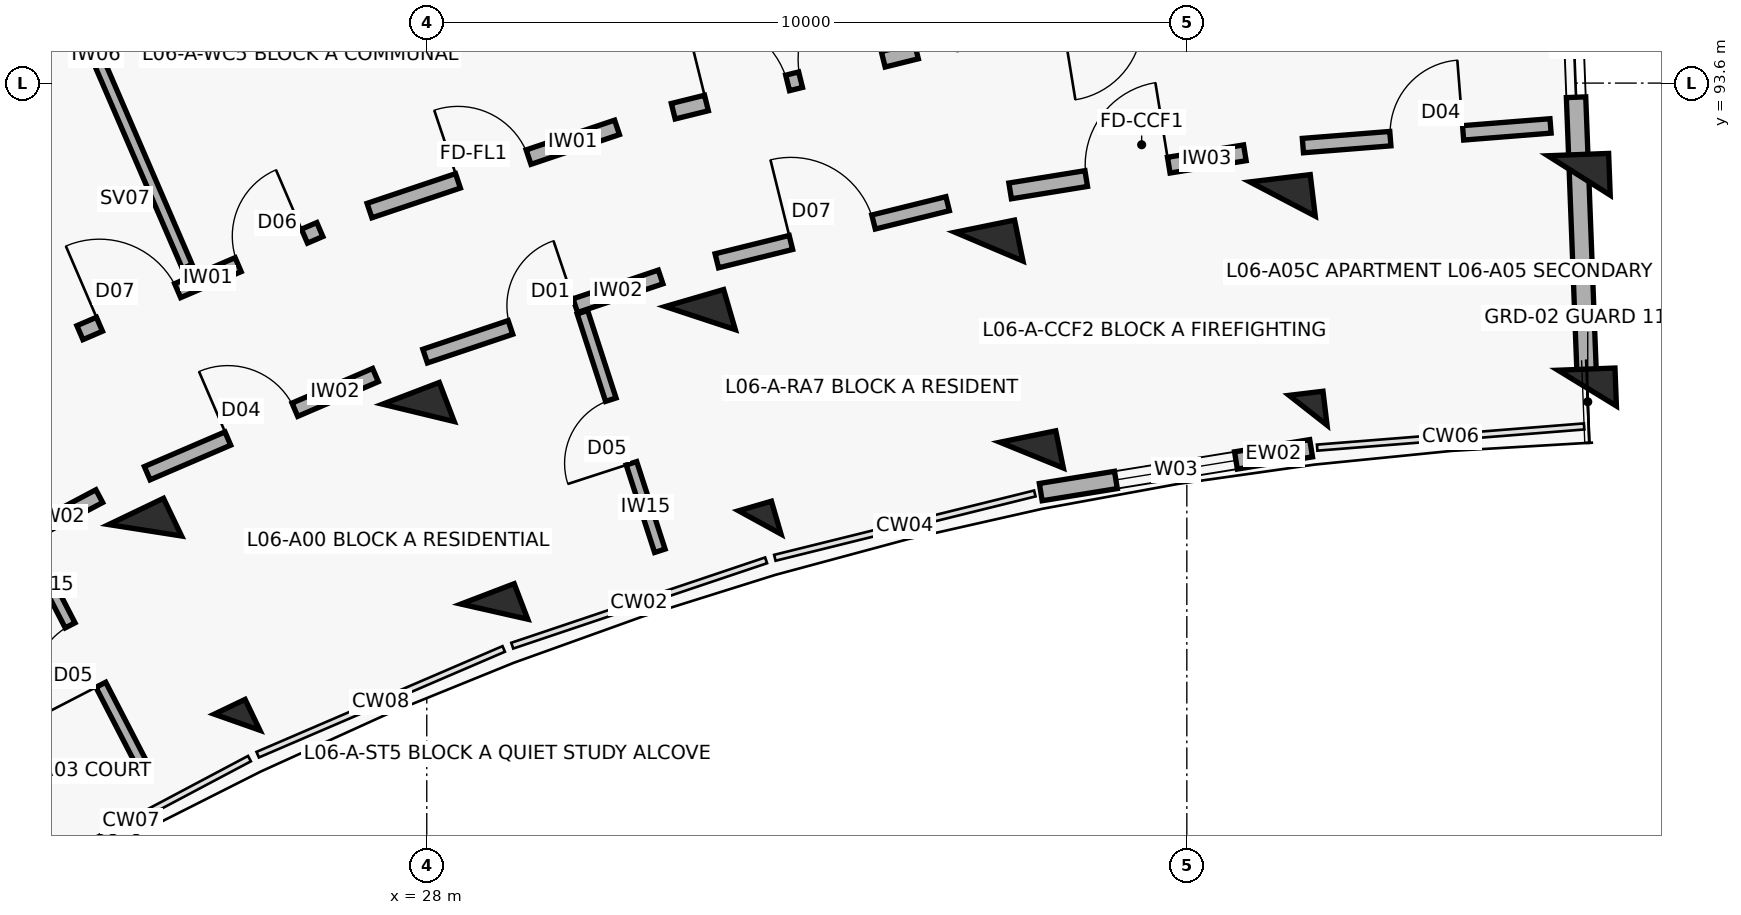
"""IFC4 building model, lengths in metres.
Left out: names, types, materials, properties, quantities, classifications, styles, units other than length and angle.
Written with IfcOpenShell. Run it as: python <this file> out.ifc"""

import sys

from ifc_helpers import new_model, si_unit, direction, frame, frame_2d, origin, origin_2d, place, context, subcontext, project, spatial, rectangle, extrude, element, fill, save


model = new_model("IFC4")
c1 = context("Model", 3, precision=1e-05, world=origin(), true_north=direction((0.0, 1.0)))
c2 = subcontext(c1, "Body", "Model", "MODEL_VIEW")
j1 = project(units=[si_unit("LENGTHUNIT", "METRE"), si_unit("PLANEANGLEUNIT", "RADIAN")], contexts=[c1])
p1 = place(None, origin())
s1 = spatial("IfcSite", under=j1, at=p1, CompositionType="ELEMENT")
p2 = place(p1, origin())
s2 = spatial("IfcBuilding", under=s1, at=p2, CompositionType="ELEMENT")
p3 = place(p2, frame((0.0, 0.0, 20.5)))
s3 = spatial("IfcBuildingStorey", under=s2, at=p3, CompositionType="ELEMENT", Elevation=20.5)
p4 = place(p3, frame((25.504, 85.191, 0.0), z_axis=(0.0, 0.0, 1.0), x_axis=(-0.432085748802, 0.901832526405, 0.0)))
e1 = element("IfcColumn", 1, at=p4, inside=s3, PredefinedType="COLUMN", context=c2, shape_type="SweptSolid", body=[
    extrude(rectangle(XDim=0.45, YDim=0.45, at=origin_2d()), origin(), (0.0, 0.0, 1.0), 3.1),
])
p5 = place(p3, frame((24.294, 87.716, 0.0), z_axis=(0.0, 0.0, 1.0), x_axis=(-0.432085748802, 0.901832526405, 0.0)))
e2 = element("IfcColumn", 2, at=p5, inside=s3, PredefinedType="COLUMN", context=c2, shape_type="SweptSolid", body=[
    extrude(rectangle(XDim=0.55, YDim=0.8, at=origin_2d()), origin(), (0.0, 0.0, 1.0), 3.1),
])
p6 = place(p3, frame((28.889, 86.646, 0.0), z_axis=(0.0, 0.0, 1.0), x_axis=(-0.357064076459, 0.934079892355, 0.0)))
e3 = element("IfcColumn", 3, at=p6, inside=s3, PredefinedType="COLUMN", context=c2, shape_type="SweptSolid", body=[
    extrude(rectangle(XDim=0.5, YDim=0.75, at=origin_2d()), origin(), (0.0, 0.0, 1.0), 3.1),
])
p7 = place(p3, frame((27.889, 89.261, 0.0), z_axis=(0.0, 0.0, 1.0), x_axis=(-0.357064076459, 0.934079892355, 0.0)))
e4 = element("IfcColumn", 4, at=p7, inside=s3, PredefinedType="COLUMN", context=c2, shape_type="SweptSolid", body=[
    extrude(rectangle(XDim=0.55, YDim=0.8, at=origin_2d()), origin(), (0.0, 0.0, 1.0), 3.1),
])
p8 = place(p3, frame((32.382, 87.82, 0.0), z_axis=(0.0, 0.0, 1.0), x_axis=(-0.27966144946, 0.96009867914, 0.0)))
e5 = element("IfcColumn", 5, at=p8, inside=s3, PredefinedType="COLUMN", context=c2, shape_type="SweptSolid", body=[
    extrude(rectangle(XDim=0.45, YDim=0.45, at=origin_2d()), origin(), (0.0, 0.0, 1.0), 3.1),
])
p9 = place(p3, frame((31.599, 90.508, 0.0), z_axis=(0.0, 0.0, 1.0), x_axis=(-0.27966144946, 0.96009867914, 0.0)))
e6 = element("IfcColumn", 6, at=p9, inside=s3, PredefinedType="COLUMN", context=c2, shape_type="SweptSolid", body=[
    extrude(rectangle(XDim=0.55, YDim=0.8, at=origin_2d()), origin(), (0.0, 0.0, 1.0), 3.1),
])
p10 = place(p3, frame((35.958, 88.705, 0.0), z_axis=(0.0, 0.0, 1.0), x_axis=(-0.200393999665, 0.979715389742, 0.0)))
e7 = element("IfcColumn", 7, at=p10, inside=s3, PredefinedType="COLUMN", context=c2, shape_type="SweptSolid", body=[
    extrude(rectangle(XDim=0.5, YDim=0.75, at=origin_2d()), origin(), (0.0, 0.0, 1.0), 3.1),
])
p11 = place(p3, frame((35.397, 91.448, 0.0), z_axis=(0.0, 0.0, 1.0), x_axis=(-0.200393999665, 0.979715389742, 0.0)))
e8 = element("IfcColumn", 8, at=p11, inside=s3, PredefinedType="COLUMN", context=c2, shape_type="SweptSolid", body=[
    extrude(rectangle(XDim=0.55, YDim=0.8, at=origin_2d()), origin(), (0.0, 0.0, 1.0), 3.1),
])
p12 = place(p3, frame((39.595, 89.295, 0.0), z_axis=(0.0, 0.0, 1.0), x_axis=(-0.119790293837, 0.992799217114, 0.0)))
e9 = element("IfcColumn", 9, at=p12, inside=s3, PredefinedType="COLUMN", context=c2, shape_type="SweptSolid", body=[
    extrude(rectangle(XDim=0.45, YDim=0.45, at=origin_2d()), origin(), (0.0, 0.0, 1.0), 3.1),
])
p13 = place(p3, frame((39.26, 92.075, 0.0), z_axis=(0.0, 0.0, 1.0), x_axis=(-0.119790293837, 0.992799217114, 0.0)))
e10 = element("IfcColumn", 10, at=p13, inside=s3, PredefinedType="COLUMN", context=c2, shape_type="SweptSolid", body=[
    extrude(rectangle(XDim=0.55, YDim=0.8, at=origin_2d()), origin(), (0.0, 0.0, 1.0), 3.1),
])
p14 = place(p3, frame((43.268, 89.587, 0.0), z_axis=(0.0, 0.0, 1.0), x_axis=(-0.038387809088, 0.999262916411, 0.0)))
e11 = element("IfcColumn", 11, at=p14, inside=s3, PredefinedType="COLUMN", context=c2, shape_type="SweptSolid", body=[
    extrude(rectangle(XDim=0.5, YDim=0.75, at=origin_2d()), origin(), (0.0, 0.0, 1.0), 3.1),
])
p15 = place(p3, frame((43.16, 92.385, 0.0), z_axis=(0.0, 0.0, 1.0), x_axis=(-0.038387809088, 0.999262916411, 0.0)))
e12 = element("IfcColumn", 12, at=p15, inside=s3, PredefinedType="COLUMN", context=c2, shape_type="SweptSolid", body=[
    extrude(rectangle(XDim=0.55, YDim=0.8, at=origin_2d()), origin(), (0.0, 0.0, 1.0), 3.1),
])
p16 = place(p3, frame((36.078, 88.218, 0.0), z_axis=(0.0, 0.0, 1.0), x_axis=(0.987080874485, 0.160222804952, 0.0)))
e13 = element("IfcWall", 13, at=p16, inside=s3, PredefinedType="SOLIDWALL", context=c2, shape_type="SweptSolid", body=[
    extrude(rectangle(XDim=3.604, YDim=0.23, at=frame_2d((1.802, 0.0))), origin(), (0.0, 0.0, 1.0), 2.25),
])
p17 = place(p16, frame((1.002, 0.0, 0.32)))
e14 = element("IfcOpeningElement", 14, at=p17, cuts=e13, PredefinedType="OPENING", context=c2, shape_type="SweptSolid", body=[
    extrude(rectangle(XDim=1.6, YDim=1.5, at=frame_2d((0.8, 0.75))), frame((0.0, 0.125, 0.0), z_axis=(0.0, -1.0, 0.0), x_axis=(1.0, 0.0, 0.0)), (0.0, 0.0, 1.0), 0.25),
])
p18 = place(p3, frame((43.259, 89.827, 0.0), z_axis=(0.0, 0.0, 1.0), x_axis=(-0.038407966241, 0.999262141847, 0.0)))
e15 = element("IfcWall", 15, at=p18, inside=s3, PredefinedType="SOLIDWALL", context=c2, shape_type="SweptSolid", body=[
    extrude(rectangle(XDim=8.2, YDim=0.255, at=frame_2d((4.1, 0.0))), origin(), (0.0, 0.0, 1.0), 2.18),
])
p19 = place(p18, frame((3.59, 0.0, 0.75)))
e16 = element("IfcOpeningElement", 16, at=p19, cuts=e15, PredefinedType="OPENING", context=c2, shape_type="SweptSolid", body=[
    extrude(rectangle(XDim=1.35, YDim=1.35, at=frame_2d((0.675, 0.675))), frame((0.0, 0.137, 0.0), z_axis=(0.0, -1.0, 0.0), x_axis=(1.0, 0.0, 0.0)), (0.0, 0.0, 1.0), 0.275),
])
p20 = place(p3, frame((20.804, 86.634, 0.0), z_axis=(0.0, 0.0, 1.0), x_axis=(0.883444301944, 0.468536194293, 0.0)))
e17 = element("IfcWall", 17, at=p20, inside=s3, PredefinedType="SOLIDWALL", context=c2, shape_type="SweptSolid", body=[
    extrude(rectangle(XDim=3.269, YDim=0.19, at=frame_2d((1.634, 0.0))), origin(), (0.0, 0.0, 1.0), 2.08),
])
p21 = place(p20, frame((1.164, 0.0, 0.0)))
e18 = element("IfcOpeningElement", 18, at=p21, cuts=e17, PredefinedType="OPENING", context=c2, shape_type="SweptSolid", body=[
    extrude(rectangle(XDim=0.94, YDim=2.1, at=frame_2d((0.47, 1.05))), frame((0.0, 0.105, 0.0), z_axis=(0.0, -1.0, 0.0), x_axis=(1.0, 0.0, 0.0)), (0.0, 0.0, 1.0), 0.21),
])
p22 = place(p3, frame((24.267, 84.608, 0.0), z_axis=(0.0, 0.0, 1.0), x_axis=(-0.459217611894, 0.888323806349, 0.0)))
e19 = element("IfcWall", 19, at=p22, inside=s3, PredefinedType="PARTITIONING", context=c2, shape_type="SweptSolid", body=[
    extrude(rectangle(XDim=3.3, YDim=0.145, at=frame_2d((1.65, 0.0))), origin(), (0.0, 0.0, 1.0), 2.08),
])
p23 = place(p22, frame((1.21, 0.0, 0.0)))
e20 = element("IfcOpeningElement", 20, at=p23, cuts=e19, PredefinedType="OPENING", context=c2, shape_type="SweptSolid", body=[
    extrude(rectangle(XDim=0.88, YDim=2.1, at=frame_2d((0.44, 1.05))), frame((0.0, 0.083, 0.0), z_axis=(0.0, -1.0, 0.0), x_axis=(1.0, 0.0, 0.0)), (0.0, 0.0, 1.0), 0.165),
])
p24 = place(p3, frame((23.437, 90.316, 0.0), z_axis=(0.0, 0.0, 1.0), x_axis=(0.918718172399, 0.394913813008, 0.0)))
e21 = element("IfcWall", 21, at=p24, inside=s3, PredefinedType="SOLIDWALL", context=c2, shape_type="SweptSolid", body=[
    extrude(rectangle(XDim=3.436, YDim=0.2, at=frame_2d((1.718, 0.0))), origin(), (0.0, 0.0, 1.0), 2.08),
])
p25 = place(p24, frame((0.28, 0.0, 0.0)))
e22 = element("IfcOpeningElement", 22, at=p25, cuts=e21, PredefinedType="OPENING", context=c2, shape_type="SweptSolid", body=[
    extrude(rectangle(XDim=1.12, YDim=2.15, at=frame_2d((0.56, 1.075))), frame((0.0, 0.11, 0.0), z_axis=(0.0, -1.0, 0.0), x_axis=(1.0, 0.0, 0.0)), (0.0, 0.0, 1.0), 0.22),
])
p26 = place(p24, frame((2.266, 0.0, 0.0)))
e23 = element("IfcOpeningElement", 23, at=p26, cuts=e21, PredefinedType="OPENING", context=c2, shape_type="SweptSolid", body=[
    extrude(rectangle(XDim=0.95, YDim=2.1, at=frame_2d((0.475, 1.05))), frame((0.0, 0.11, 0.0), z_axis=(0.0, -1.0, 0.0), x_axis=(1.0, 0.0, 0.0)), (0.0, 0.0, 1.0), 0.22),
])
p27 = place(p3, frame((24.322, 88.467, 0.0), z_axis=(0.0, 0.0, 1.0), x_axis=(0.918723391052, 0.394901672235, 0.0)))
e24 = element("IfcWall", 24, at=p27, inside=s3, PredefinedType="SOLIDWALL", context=c2, shape_type="SweptSolid", body=[
    extrude(rectangle(XDim=3.269, YDim=0.19, at=frame_2d((1.634, 0.0))), origin(), (0.0, 0.0, 1.0), 2.08),
])
p28 = place(p27, frame((1.154, 0.0, 0.0)))
e25 = element("IfcOpeningElement", 25, at=p28, cuts=e24, PredefinedType="OPENING", context=c2, shape_type="SweptSolid", body=[
    extrude(rectangle(XDim=0.96, YDim=2.1, at=frame_2d((0.48, 1.05))), frame((0.0, 0.105, 0.0), z_axis=(0.0, -1.0, 0.0), x_axis=(1.0, 0.0, 0.0)), (0.0, 0.0, 1.0), 0.21),
])
p29 = place(p3, frame((24.849, 91.187, 0.0), z_axis=(0.0, 0.0, 1.0), x_axis=(-0.396278945437, 0.91813016365, 0.0)))
e26 = element("IfcWall", 26, at=p29, inside=s3, PredefinedType="PARTITIONING", context=c2, shape_type="SweptSolid", body=[
    extrude(rectangle(XDim=7.95, YDim=0.14, at=frame_2d((3.975, 0.0))), origin(), (0.0, 0.0, 1.0), 2.08),
])
p30 = place(p29, frame((6.05, 0.0, 0.0)))
e27 = element("IfcOpeningElement", 27, at=p30, cuts=e26, PredefinedType="OPENING", context=c2, shape_type="SweptSolid", body=[
    extrude(rectangle(XDim=0.92, YDim=2.1, at=frame_2d((0.46, 1.05))), frame((0.0, 0.08, 0.0), z_axis=(0.0, -1.0, 0.0), x_axis=(1.0, 0.0, 0.0)), (0.0, 0.0, 1.0), 0.16),
])
p31 = place(p3, frame((27.247, 91.923, 0.0), z_axis=(0.0, 0.0, 1.0), x_axis=(0.947863007629, 0.318678080151, 0.0)))
e28 = element("IfcWall", 28, at=p31, inside=s3, PredefinedType="SOLIDWALL", context=c2, shape_type="SweptSolid", body=[
    extrude(rectangle(XDim=3.436, YDim=0.2, at=frame_2d((1.718, 0.0))), origin(), (0.0, 0.0, 1.0), 2.08),
])
p32 = place(p31, frame((1.228, 0.0, 0.0)))
e29 = element("IfcOpeningElement", 29, at=p32, cuts=e28, PredefinedType="OPENING", context=c2, shape_type="SweptSolid", body=[
    extrude(rectangle(XDim=0.98, YDim=2.15, at=frame_2d((0.49, 1.075))), frame((0.0, 0.11, 0.0), z_axis=(0.0, -1.0, 0.0), x_axis=(1.0, 0.0, 0.0)), (0.0, 0.0, 1.0), 0.22),
])
p33 = place(p3, frame((27.979, 90.008, 0.0), z_axis=(0.0, 0.0, 1.0), x_axis=(0.94787351033, 0.318646839643, 0.0)))
e30 = element("IfcWall", 30, at=p33, inside=s3, PredefinedType="SOLIDWALL", context=c2, shape_type="SweptSolid", body=[
    extrude(rectangle(XDim=3.269, YDim=0.19, at=frame_2d((1.634, 0.0))), origin(), (0.0, 0.0, 1.0), 2.08),
])
p34 = place(p33, frame((1.184, 0.0, 0.0)))
e31 = element("IfcOpeningElement", 31, at=p34, cuts=e30, PredefinedType="OPENING", context=c2, shape_type="SweptSolid", body=[
    extrude(rectangle(XDim=0.9, YDim=2.1, at=frame_2d((0.45, 1.05))), frame((0.0, 0.105, 0.0), z_axis=(0.0, -1.0, 0.0), x_axis=(1.0, 0.0, 0.0)), (0.0, 0.0, 1.0), 0.21),
])
p35 = place(p3, frame((31.066, 87.446, 0.0), z_axis=(0.0, 0.0, 1.0), x_axis=(-0.308582493915, 0.951197584337, 0.0)))
e32 = element("IfcWall", 32, at=p35, inside=s3, PredefinedType="PARTITIONING", context=c2, shape_type="SweptSolid", body=[
    extrude(rectangle(XDim=3.3, YDim=0.145, at=frame_2d((1.65, 0.0))), origin(), (0.0, 0.0, 1.0), 2.08),
])
p36 = place(p35, frame((1.21, 0.0, 0.0)))
e33 = element("IfcOpeningElement", 33, at=p36, cuts=e32, PredefinedType="OPENING", context=c2, shape_type="SweptSolid", body=[
    extrude(rectangle(XDim=0.88, YDim=2.1, at=frame_2d((0.44, 1.05))), frame((0.0, 0.083, 0.0), z_axis=(0.0, -1.0, 0.0), x_axis=(1.0, 0.0, 0.0)), (0.0, 0.0, 1.0), 0.165),
])
p37 = place(p3, frame((31.243, 93.23, 0.0), z_axis=(0.0, 0.0, 1.0), x_axis=(0.970719238682, 0.240216901263, 0.0)))
e34 = element("IfcWall", 34, at=p37, inside=s3, PredefinedType="SOLIDWALL", context=c2, shape_type="SweptSolid", body=[
    extrude(rectangle(XDim=3.296, YDim=0.21, at=frame_2d((1.648, 0.0))), origin(), (0.0, 0.0, 1.0), 2.08),
])
p38 = place(p37, frame((0.45, 0.0, 0.0)))
e35 = element("IfcOpeningElement", 35, at=p38, cuts=e34, PredefinedType="OPENING", context=c2, shape_type="SweptSolid", body=[
    extrude(rectangle(XDim=1.1, YDim=2.15, at=frame_2d((0.55, 1.075))), frame((0.0, 0.115, 0.0), z_axis=(0.0, -1.0, 0.0), x_axis=(1.0, 0.0, 0.0)), (0.0, 0.0, 1.0), 0.23),
])
p39 = place(p37, frame((1.726, 0.0, 0.0)))
e36 = element("IfcOpeningElement", 36, at=p39, cuts=e34, PredefinedType="OPENING", context=c2, shape_type="SweptSolid", body=[
    extrude(rectangle(XDim=1.12, YDim=2.15, at=frame_2d((0.56, 1.075))), frame((0.0, 0.115, 0.0), z_axis=(0.0, -1.0, 0.0), x_axis=(1.0, 0.0, 0.0)), (0.0, 0.0, 1.0), 0.23),
])
p40 = place(p3, frame((31.816, 91.262, 0.0), z_axis=(0.0, 0.0, 1.0), x_axis=(0.970727194092, 0.240184751078, 0.0)))
e37 = element("IfcWall", 37, at=p40, inside=s3, PredefinedType="SOLIDWALL", context=c2, shape_type="SweptSolid", body=[
    extrude(rectangle(XDim=3.129, YDim=0.19, at=frame_2d((1.564, 0.0))), origin(), (0.0, 0.0, 1.0), 2.08),
])
p41 = place(p40, frame((1.004, 0.0, 0.0)))
e38 = element("IfcOpeningElement", 38, at=p41, cuts=e37, PredefinedType="OPENING", context=c2, shape_type="SweptSolid", body=[
    extrude(rectangle(XDim=1.12, YDim=2.15, at=frame_2d((0.56, 1.075))), frame((0.0, 0.105, 0.0), z_axis=(0.0, -1.0, 0.0), x_axis=(1.0, 0.0, 0.0)), (0.0, 0.0, 1.0), 0.21),
])
p42 = place(p3, frame((35.676, 92.181, 0.0), z_axis=(0.0, 0.0, 1.0), x_axis=(0.98707079686, 0.160284877599, 0.0)))
e39 = element("IfcWall", 39, at=p42, inside=s3, PredefinedType="SOLIDWALL", context=c2, shape_type="SweptSolid", body=[
    extrude(rectangle(XDim=3.129, YDim=0.21, at=frame_2d((1.564, 0.0))), origin(), (0.0, 0.0, 1.0), 2.08),
])
p43 = place(p42, frame((1.014, 0.0, 0.0)))
e40 = element("IfcOpeningElement", 40, at=p43, cuts=e39, PredefinedType="OPENING", context=c2, shape_type="SweptSolid", body=[
    extrude(rectangle(XDim=1.1, YDim=2.15, at=frame_2d((0.55, 1.075))), frame((0.0, 0.115, 0.0), z_axis=(0.0, -1.0, 0.0), x_axis=(1.0, 0.0, 0.0)), (0.0, 0.0, 1.0), 0.23),
])
p44 = place(p3, frame((39.527, 92.778, 0.0), z_axis=(0.0, 0.0, 1.0), x_axis=(0.99686660806, 0.07910098441, 0.0)))
e41 = element("IfcWall", 41, at=p44, inside=s3, PredefinedType="SOLIDWALL", context=c2, shape_type="SweptSolid", body=[
    extrude(rectangle(XDim=3.269, YDim=0.19, at=frame_2d((1.634, 0.0))), origin(), (0.0, 0.0, 1.0), 2.08),
])
p45 = place(p44, frame((1.154, 0.0, 0.0)))
e42 = element("IfcOpeningElement", 42, at=p45, cuts=e41, PredefinedType="OPENING", context=c2, shape_type="SweptSolid", body=[
    extrude(rectangle(XDim=0.96, YDim=2.1, at=frame_2d((0.48, 1.05))), frame((0.0, 0.105, 0.0), z_axis=(0.0, -1.0, 0.0), x_axis=(1.0, 0.0, 0.0)), (0.0, 0.0, 1.0), 0.21),
])
p46 = place(p17, origin())
e43 = element("IfcWindow", 43, at=p46, inside=s3, PartitioningType="DOUBLE_PANEL_VERTICAL", PredefinedType="WINDOW", context=c2, shape_type="SweptSolid", body=[
    extrude(rectangle(XDim=1.6, YDim=1.5, at=frame_2d((0.8, 0.75))), frame((0.0, 0.03, 0.0), z_axis=(0.0, -1.0, 0.0), x_axis=(1.0, 0.0, 0.0)), (0.0, 0.0, 1.0), 0.06),
])
fill(e14, e43)
p47 = place(p19, origin())
e44 = element("IfcWindow", 44, at=p47, inside=s3, PartitioningType="DOUBLE_PANEL_VERTICAL", PredefinedType="WINDOW", context=c2, shape_type="SweptSolid", body=[
    extrude(rectangle(XDim=1.35, YDim=1.35, at=frame_2d((0.675, 0.675))), frame((0.0, 0.03, 0.0), z_axis=(0.0, -1.0, 0.0), x_axis=(1.0, 0.0, 0.0)), (0.0, 0.0, 1.0), 0.06),
])
fill(e16, e44)
p48 = place(p23, origin())
e45 = element("IfcDoor", 45, at=p48, inside=s3, OperationType="SINGLE_SWING_LEFT", PredefinedType="DOOR", context=c2, shape_type="SweptSolid", body=[
    extrude(rectangle(XDim=0.88, YDim=2.1, at=frame_2d((0.44, 1.05))), frame((0.0, 0.025, 0.0), z_axis=(0.0, -1.0, 0.0), x_axis=(1.0, 0.0, 0.0)), (0.0, 0.0, 1.0), 0.05),
])
fill(e20, e45)
p49 = place(p25, origin())
e46 = element("IfcDoor", 46, at=p49, inside=s3, OperationType="SINGLE_SWING_LEFT", PredefinedType="DOOR", context=c2, shape_type="SweptSolid", body=[
    extrude(rectangle(XDim=1.12, YDim=2.15, at=frame_2d((0.56, 1.075))), frame((0.0, 0.025, 0.0), z_axis=(0.0, -1.0, 0.0), x_axis=(1.0, 0.0, 0.0)), (0.0, 0.0, 1.0), 0.05),
])
fill(e22, e46)
p50 = place(p26, origin())
e47 = element("IfcDoor", 47, at=p50, inside=s3, OperationType="SINGLE_SWING_RIGHT", PredefinedType="DOOR", context=c2, shape_type="SweptSolid", body=[
    extrude(rectangle(XDim=0.95, YDim=2.1, at=frame_2d((0.475, 1.05))), frame((0.0, 0.025, 0.0), z_axis=(0.0, -1.0, 0.0), x_axis=(1.0, 0.0, 0.0)), (0.0, 0.0, 1.0), 0.05),
])
fill(e23, e47)
p51 = place(p28, origin())
e48 = element("IfcDoor", 48, at=p51, inside=s3, OperationType="SINGLE_SWING_LEFT", PredefinedType="DOOR", context=c2, shape_type="SweptSolid", body=[
    extrude(rectangle(XDim=0.96, YDim=2.1, at=frame_2d((0.48, 1.05))), frame((0.0, 0.025, 0.0), z_axis=(0.0, -1.0, 0.0), x_axis=(1.0, 0.0, 0.0)), (0.0, 0.0, 1.0), 0.05),
])
fill(e25, e48)
p52 = place(p32, origin())
e49 = element("IfcDoor", 49, at=p52, inside=s3, OperationType="SINGLE_SWING_LEFT", PredefinedType="DOOR", context=c2, shape_type="SweptSolid", body=[
    extrude(rectangle(XDim=0.98, YDim=2.15, at=frame_2d((0.49, 1.075))), frame((0.0, 0.025, 0.0), z_axis=(0.0, -1.0, 0.0), x_axis=(1.0, 0.0, 0.0)), (0.0, 0.0, 1.0), 0.05),
])
fill(e29, e49)
p53 = place(p34, origin())
e50 = element("IfcDoor", 50, at=p53, inside=s3, OperationType="SINGLE_SWING_RIGHT", PredefinedType="DOOR", context=c2, shape_type="SweptSolid", body=[
    extrude(rectangle(XDim=0.9, YDim=2.1, at=frame_2d((0.45, 1.05))), frame((0.0, 0.025, 0.0), z_axis=(0.0, -1.0, 0.0), x_axis=(1.0, 0.0, 0.0)), (0.0, 0.0, 1.0), 0.05),
])
fill(e31, e50)
p54 = place(p36, origin())
e51 = element("IfcDoor", 51, at=p54, inside=s3, OperationType="SINGLE_SWING_LEFT", PredefinedType="DOOR", context=c2, shape_type="SweptSolid", body=[
    extrude(rectangle(XDim=0.88, YDim=2.1, at=frame_2d((0.44, 1.05))), frame((0.0, 0.025, 0.0), z_axis=(0.0, -1.0, 0.0), x_axis=(1.0, 0.0, 0.0)), (0.0, 0.0, 1.0), 0.05),
])
fill(e33, e51)
p55 = place(p38, origin())
e52 = element("IfcDoor", 52, at=p55, inside=s3, OperationType="SINGLE_SWING_LEFT", PredefinedType="DOOR", context=c2, shape_type="SweptSolid", body=[
    extrude(rectangle(XDim=1.1, YDim=2.15, at=frame_2d((0.55, 1.075))), frame((0.0, 0.025, 0.0), z_axis=(0.0, -1.0, 0.0), x_axis=(1.0, 0.0, 0.0)), (0.0, 0.0, 1.0), 0.05),
])
fill(e35, e52)
p56 = place(p39, origin())
e53 = element("IfcDoor", 53, at=p56, inside=s3, OperationType="SINGLE_SWING_RIGHT", PredefinedType="DOOR", context=c2, shape_type="SweptSolid", body=[
    extrude(rectangle(XDim=1.12, YDim=2.15, at=frame_2d((0.56, 1.075))), frame((0.0, 0.025, 0.0), z_axis=(0.0, -1.0, 0.0), x_axis=(1.0, 0.0, 0.0)), (0.0, 0.0, 1.0), 0.05),
])
fill(e36, e53)
p57 = place(p41, origin())
e54 = element("IfcDoor", 54, at=p57, inside=s3, OperationType="SINGLE_SWING_LEFT", PredefinedType="DOOR", context=c2, shape_type="SweptSolid", body=[
    extrude(rectangle(XDim=1.12, YDim=2.15, at=frame_2d((0.56, 1.075))), frame((0.0, 0.025, 0.0), z_axis=(0.0, -1.0, 0.0), x_axis=(1.0, 0.0, 0.0)), (0.0, 0.0, 1.0), 0.05),
])
fill(e38, e54)
p58 = place(p43, origin())
e55 = element("IfcDoor", 55, at=p58, inside=s3, OperationType="SINGLE_SWING_RIGHT", PredefinedType="DOOR", context=c2, shape_type="SweptSolid", body=[
    extrude(rectangle(XDim=1.1, YDim=2.15, at=frame_2d((0.55, 1.075))), frame((0.0, 0.025, 0.0), z_axis=(0.0, -1.0, 0.0), x_axis=(1.0, 0.0, 0.0)), (0.0, 0.0, 1.0), 0.05),
])
fill(e40, e55)
p59 = place(p45, origin())
e56 = element("IfcDoor", 56, at=p59, inside=s3, OperationType="SINGLE_SWING_RIGHT", PredefinedType="DOOR", context=c2, shape_type="SweptSolid", body=[
    extrude(rectangle(XDim=0.96, YDim=2.1, at=frame_2d((0.48, 1.05))), frame((0.0, 0.025, 0.0), z_axis=(0.0, -1.0, 0.0), x_axis=(1.0, 0.0, 0.0)), (0.0, 0.0, 1.0), 0.05),
])
fill(e42, e56)
save(model, sys.argv[1])
